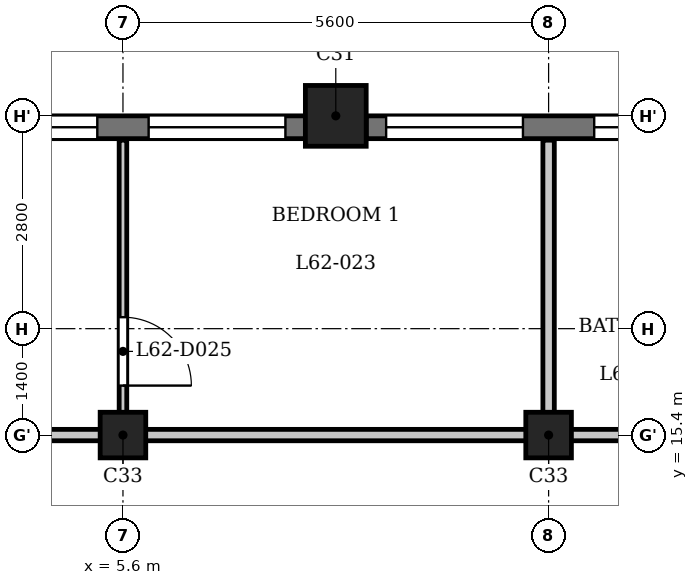
"""IFC4 building model, lengths in metres.
Left out: names, types, materials, properties, quantities, classifications, styles, units other than length and angle.
Written with IfcOpenShell. Run it as: python <this file> out.ifc"""

import sys

from ifc_helpers import new_model, si_unit, direction, frame, frame_2d, origin, origin_2d, place, context, subcontext, project, spatial, rectangle, extrude, element, fill, save


model = new_model("IFC4")
c1 = context("Model", 3, precision=1e-05, world=origin(), true_north=direction((0.0, 1.0)))
c2 = subcontext(c1, "Body", "Model", "MODEL_VIEW")
j1 = project(units=[si_unit("LENGTHUNIT", "METRE"), si_unit("PLANEANGLEUNIT", "RADIAN")], contexts=[c1])
p1 = place(None, origin())
s1 = spatial("IfcSite", under=j1, at=p1, CompositionType="ELEMENT")
p2 = place(p1, origin())
s2 = spatial("IfcBuilding", under=s1, at=p2, CompositionType="ELEMENT")
p3 = place(p2, frame((0.0, 0.0, 241.7)))
s3 = spatial("IfcBuildingStorey", under=s2, at=p3, CompositionType="ELEMENT", Elevation=241.7)
p4 = place(p3, frame((8.4, 19.6, 0.0), z_axis=(0.0, 0.0, 1.0), x_axis=(1.0, 0.0, 0.0)))
e1 = element("IfcColumn", 1, at=p4, inside=s3, PredefinedType="COLUMN", context=c2, shape_type="SweptSolid", body=[
    extrude(rectangle(XDim=0.8, YDim=0.8, at=origin_2d()), origin(), (0.0, 0.0, 1.0), 3.5),
])
for number, where, z_axis, x_axis in (
    (2, (5.6, 15.4, 0.0), (0.0, 0.0, 1.0), (1.0, 0.0, 0.0)),
    (3, (11.2, 15.4, 0.0), (0.0, 0.0, 1.0), (1.0, 0.0, 0.0)),
):
    element("IfcColumn", number, at=place(p3, frame(where, z_axis=z_axis, x_axis=x_axis)), inside=s3, PredefinedType="COLUMN", context=c2, shape_type="SweptSolid", body=[
        extrude(rectangle(XDim=0.6, YDim=0.6, at=origin_2d()), origin(), (0.0, 0.0, 1.0), 3.5),
    ])
p5 = place(p3, frame((13.6, 19.45, 0.0), z_axis=(0.0, 0.0, 1.0), x_axis=(-1.0, 0.0, 0.0)))
e4 = element("IfcWall", 4, at=p5, inside=s3, PredefinedType="SOLIDWALL", context=c2, shape_type="SweptSolid", body=[
    extrude(rectangle(XDim=4.8, YDim=0.3, at=frame_2d((2.4, 0.0))), origin(), (0.0, 0.0, 1.0), 2.55),
])
p6 = place(p5, frame((0.6, 0.0, 0.6)))
e5 = element("IfcOpeningElement", 5, at=p6, cuts=e4, PredefinedType="OPENING", context=c2, shape_type="SweptSolid", body=[
    extrude(rectangle(XDim=1.2, YDim=1.55, at=frame_2d((0.6, 0.775))), frame((0.0, 0.16, 0.0), z_axis=(0.0, -1.0, 0.0), x_axis=(1.0, 0.0, 0.0)), (0.0, 0.0, 1.0), 0.32),
])
p7 = place(p5, frame((2.738, 0.0, 0.9)))
e6 = element("IfcOpeningElement", 6, at=p7, cuts=e4, PredefinedType="OPENING", context=c2, shape_type="SweptSolid", body=[
    extrude(rectangle(XDim=1.8, YDim=1.25, at=frame_2d((0.9, 0.625))), frame((0.0, 0.16, 0.0), z_axis=(0.0, -1.0, 0.0), x_axis=(1.0, 0.0, 0.0)), (0.0, 0.0, 1.0), 0.32),
])
p8 = place(p3, frame((8.0, 19.45, 0.0), z_axis=(0.0, 0.0, 1.0), x_axis=(-1.0, 0.0, 0.0)))
e7 = element("IfcWall", 7, at=p8, inside=s3, PredefinedType="SOLIDWALL", context=c2, shape_type="SweptSolid", body=[
    extrude(rectangle(XDim=4.8, YDim=0.3, at=frame_2d((2.4, 0.0))), origin(), (0.0, 0.0, 1.0), 2.55),
])
p9 = place(p8, frame((0.262, 0.0, 0.9)))
e8 = element("IfcOpeningElement", 8, at=p9, cuts=e7, PredefinedType="OPENING", context=c2, shape_type="SweptSolid", body=[
    extrude(rectangle(XDim=1.8, YDim=1.25, at=frame_2d((0.9, 0.625))), frame((0.0, 0.16, 0.0), z_axis=(0.0, -1.0, 0.0), x_axis=(1.0, 0.0, 0.0)), (0.0, 0.0, 1.0), 0.32),
])
p10 = place(p8, frame((2.738, 0.0, 0.9)))
e9 = element("IfcOpeningElement", 9, at=p10, cuts=e7, PredefinedType="OPENING", context=c2, shape_type="SweptSolid", body=[
    extrude(rectangle(XDim=1.8, YDim=1.25, at=frame_2d((0.9, 0.625))), frame((0.0, 0.16, 0.0), z_axis=(0.0, -1.0, 0.0), x_axis=(1.0, 0.0, 0.0)), (0.0, 0.0, 1.0), 0.32),
])
p11 = place(p3, frame((-23.55, 15.4, 0.0), z_axis=(0.0, 0.0, 1.0), x_axis=(1.0, 0.0, 0.0)))
e10 = element("IfcWall", 10, at=p11, inside=s3, PredefinedType="PARTITIONING", context=c2, shape_type="SweptSolid", body=[
    extrude(rectangle(XDim=46.872, YDim=0.15, at=frame_2d((23.436, 0.0))), origin(), (0.0, 0.0, 1.0), 3.2),
])
p12 = place(p11, frame((12.9, 0.0, 0.0)))
e11 = element("IfcOpeningElement", 11, at=p12, cuts=e10, PredefinedType="OPENING", context=c2, shape_type="SweptSolid", body=[
    extrude(rectangle(XDim=1.0, YDim=2.1, at=frame_2d((0.5, 1.05))), frame((0.0, 0.085, 0.0), z_axis=(0.0, -1.0, 0.0), x_axis=(1.0, 0.0, 0.0)), (0.0, 0.0, 1.0), 0.17),
])
p13 = place(p11, frame((20.9, 0.0, 0.0)))
e12 = element("IfcOpeningElement", 12, at=p13, cuts=e10, PredefinedType="OPENING", context=c2, shape_type="SweptSolid", body=[
    extrude(rectangle(XDim=1.0, YDim=2.1, at=frame_2d((0.5, 1.05))), frame((0.0, 0.085, 0.0), z_axis=(0.0, -1.0, 0.0), x_axis=(1.0, 0.0, 0.0)), (0.0, 0.0, 1.0), 0.17),
])
p14 = place(p11, frame((37.7, 0.0, 0.0)))
e13 = element("IfcOpeningElement", 13, at=p14, cuts=e10, PredefinedType="OPENING", context=c2, shape_type="SweptSolid", body=[
    extrude(rectangle(XDim=1.0, YDim=2.1, at=frame_2d((0.5, 1.05))), frame((0.0, 0.085, 0.0), z_axis=(0.0, -1.0, 0.0), x_axis=(1.0, 0.0, 0.0)), (0.0, 0.0, 1.0), 0.17),
])
p15 = place(p3, frame((5.6, 15.475, 0.0), z_axis=(0.0, 0.0, 1.0), x_axis=(0.0, 1.0, 0.0)))
e14 = element("IfcWall", 14, at=p15, inside=s3, PredefinedType="PARTITIONING", context=c2, shape_type="SweptSolid", body=[
    extrude(rectangle(XDim=3.805, YDim=0.1, at=frame_2d((1.902, 0.0))), origin(), (0.0, 0.0, 1.0), 3.2),
])
p16 = place(p15, frame((0.576, 0.0, 0.0)))
e15 = element("IfcOpeningElement", 15, at=p16, cuts=e14, PredefinedType="OPENING", context=c2, shape_type="SweptSolid", body=[
    extrude(rectangle(XDim=0.9, YDim=2.1, at=frame_2d((0.45, 1.05))), frame((0.0, 0.06, 0.0), z_axis=(0.0, -1.0, 0.0), x_axis=(1.0, 0.0, 0.0)), (0.0, 0.0, 1.0), 0.12),
])
p17 = place(p3, frame((11.2, 15.475, 0.0), z_axis=(0.0, 0.0, 1.0), x_axis=(0.0, 1.0, 0.0)))
e16 = element("IfcWall", 16, at=p17, inside=s3, PredefinedType="PARTITIONING", context=c2, shape_type="SweptSolid", body=[
    extrude(rectangle(XDim=3.805, YDim=0.15, at=frame_2d((1.902, 0.0))), origin(), (0.0, 0.0, 1.0), 3.2),
])
p18 = place(p16, origin())
e17 = element("IfcDoor", 17, at=p18, inside=s3, OperationType="SINGLE_SWING_LEFT", PredefinedType="DOOR", context=c2, shape_type="SweptSolid", body=[
    extrude(rectangle(XDim=0.9, YDim=2.1, at=frame_2d((0.45, 1.05))), frame((0.0, 0.025, 0.0), z_axis=(0.0, -1.0, 0.0), x_axis=(1.0, 0.0, 0.0)), (0.0, 0.0, 1.0), 0.05),
])
fill(e15, e17)
p19 = place(p6, origin())
e18 = element("IfcWindow", 18, at=p19, inside=s3, PartitioningType="SINGLE_PANEL", PredefinedType="WINDOW", context=c2, shape_type="SweptSolid", body=[
    extrude(rectangle(XDim=1.2, YDim=1.55, at=frame_2d((0.6, 0.775))), frame((0.0, 0.03, 0.0), z_axis=(0.0, -1.0, 0.0), x_axis=(1.0, 0.0, 0.0)), (0.0, 0.0, 1.0), 0.06),
])
fill(e5, e18)
p20 = place(p7, origin())
e19 = element("IfcWindow", 19, at=p20, inside=s3, PartitioningType="SINGLE_PANEL", PredefinedType="WINDOW", context=c2, shape_type="SweptSolid", body=[
    extrude(rectangle(XDim=1.8, YDim=1.25, at=frame_2d((0.9, 0.625))), frame((0.0, 0.03, 0.0), z_axis=(0.0, -1.0, 0.0), x_axis=(1.0, 0.0, 0.0)), (0.0, 0.0, 1.0), 0.06),
])
fill(e6, e19)
p21 = place(p9, origin())
e20 = element("IfcWindow", 20, at=p21, inside=s3, PartitioningType="SINGLE_PANEL", PredefinedType="WINDOW", context=c2, shape_type="SweptSolid", body=[
    extrude(rectangle(XDim=1.8, YDim=1.25, at=frame_2d((0.9, 0.625))), frame((0.0, 0.03, 0.0), z_axis=(0.0, -1.0, 0.0), x_axis=(1.0, 0.0, 0.0)), (0.0, 0.0, 1.0), 0.06),
])
fill(e8, e20)
p22 = place(p10, origin())
e21 = element("IfcWindow", 21, at=p22, inside=s3, PartitioningType="SINGLE_PANEL", PredefinedType="WINDOW", context=c2, shape_type="SweptSolid", body=[
    extrude(rectangle(XDim=1.8, YDim=1.25, at=frame_2d((0.9, 0.625))), frame((0.0, 0.03, 0.0), z_axis=(0.0, -1.0, 0.0), x_axis=(1.0, 0.0, 0.0)), (0.0, 0.0, 1.0), 0.06),
])
fill(e9, e21)
save(model, sys.argv[1])
